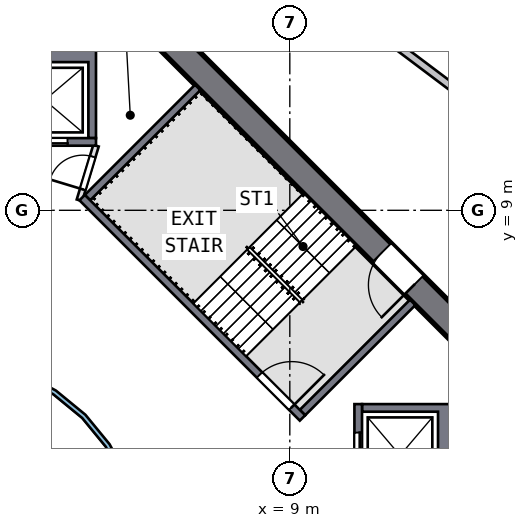
"""IFC4 building model, lengths in metres.
Left out: names, types, materials, properties, quantities, classifications, styles, units other than length and angle.
Written with IfcOpenShell. Run it as: python <this file> out.ifc"""

import sys

from ifc_helpers import new_model, si_unit, direction, frame, frame_2d, origin, place, context, subcontext, project, spatial, polyline, rectangle, outline, extrude, element, fill, save


model = new_model("IFC4")
c1 = context("Model", 3, precision=1e-05, world=origin(), true_north=direction((0.0, 1.0)))
c2 = subcontext(c1, "Body", "Model", "MODEL_VIEW")
j1 = project(units=[si_unit("LENGTHUNIT", "METRE"), si_unit("PLANEANGLEUNIT", "RADIAN")], contexts=[c1])
p1 = place(None, origin())
s1 = spatial("IfcSite", under=j1, at=p1, CompositionType="ELEMENT")
p2 = place(p1, origin())
s2 = spatial("IfcBuilding", under=s1, at=p2, CompositionType="ELEMENT")
p3 = place(p2, frame((0.0, 0.0, 128.0)))
s3 = spatial("IfcBuildingStorey", under=s2, at=p3, CompositionType="ELEMENT", Elevation=128.0)
p4 = place(p3, frame((13.752, 5.552, 0.0), z_axis=(0.0, 0.0, 1.0), x_axis=(-0.707106781, 0.707106781, 0.0)))
e1 = element("IfcWall", 1, at=p4, inside=s3, PredefinedType="SHEAR", context=c2, shape_type="SweptSolid", body=[
    extrude(rectangle(XDim=11.598, YDim=0.7, at=frame_2d((5.799, 0.0))), origin(), (0.0, 0.0, 1.0), 5.0),
])
p5 = place(p4, frame((2.099, 0.0, 0.0)))
e2 = element("IfcOpeningElement", 2, at=p5, cuts=e1, PredefinedType="OPENING", context=c2, shape_type="SweptSolid", body=[
    extrude(rectangle(XDim=1.2, YDim=2.1, at=frame_2d((0.6, 1.05))), frame((0.0, 0.36, 0.0), z_axis=(0.0, -1.0, 0.0), x_axis=(1.0, 0.0, 0.0)), (0.0, 0.0, 1.0), 0.72),
])
p6 = place(p3, origin())
e3 = element("IfcWall", 3, at=p6, inside=s3, PredefinedType="SOLIDWALL", context=c2, shape_type="SweptSolid", body=[
    extrude(outline(polyline([(13.3, 3.9), (13.3, 1.2), (10.9, 1.2), (10.9, 1.4), (12.9, 1.4), (12.9, 3.7), (10.9, 3.7), (10.9, 3.9), (13.3, 3.9)])), origin(), (0.0, 0.0, 1.0), 4.69),
])
p7 = place(p3, frame((10.8, 1.2, 0.0), z_axis=(0.0, 0.0, 1.0), x_axis=(0.0, 1.0, 0.0)))
e4 = element("IfcWall", 4, at=p7, inside=s3, PredefinedType="SOLIDWALL", context=c2, shape_type="SweptSolid", body=[
    extrude(rectangle(XDim=2.7, YDim=0.2, at=frame_2d((1.35, 0.0))), origin(), (0.0, 0.0, 1.0), 4.69),
])
p8 = place(p7, frame((0.75, 0.0, 0.0)))
e5 = element("IfcOpeningElement", 5, at=p8, cuts=e4, PredefinedType="OPENING", context=c2, shape_type="SweptSolid", body=[
    extrude(rectangle(XDim=1.2, YDim=2.1, at=frame_2d((0.6, 1.05))), frame((0.0, 0.11, 0.0), z_axis=(0.0, -1.0, 0.0), x_axis=(1.0, 0.0, 0.0)), (0.0, 0.0, 1.0), 0.22),
])
p9 = place(p3, origin())
e6 = element("IfcWall", 6, at=p9, inside=s3, PredefinedType="SOLIDWALL", context=c2, shape_type="SweptSolid", body=[
    extrude(outline(polyline([(3.9, 13.3), (3.9, 10.9), (3.7, 10.9), (3.7, 12.9), (1.4, 12.9), (1.4, 10.9), (1.2, 10.9), (1.2, 13.3), (3.9, 13.3)])), origin(), (0.0, 0.0, 1.0), 4.69),
])
p10 = place(p3, frame((1.2, 10.8, 0.0), z_axis=(0.0, 0.0, 1.0), x_axis=(1.0, 0.0, 0.0)))
e7 = element("IfcWall", 7, at=p10, inside=s3, PredefinedType="SOLIDWALL", context=c2, shape_type="SweptSolid", body=[
    extrude(rectangle(XDim=2.7, YDim=0.2, at=frame_2d((1.35, 0.0))), origin(), (0.0, 0.0, 1.0), 4.69),
])
p11 = place(p10, frame((0.75, 0.0, 0.0)))
e8 = element("IfcOpeningElement", 8, at=p11, cuts=e7, PredefinedType="OPENING", context=c2, shape_type="SweptSolid", body=[
    extrude(rectangle(XDim=1.2, YDim=2.1, at=frame_2d((0.6, 1.05))), frame((0.0, 0.11, 0.0), z_axis=(0.0, -1.0, 0.0), x_axis=(1.0, 0.0, 0.0)), (0.0, 0.0, 1.0), 0.22),
])
p12 = place(p3, frame((3.535, 9.334, 0.0), z_axis=(0.0, 0.0, 1.0), x_axis=(0.707106781, -0.707106781, 0.0)))
e9 = element("IfcWall", 9, at=p12, inside=s3, PredefinedType="SOLIDWALL", context=c2, shape_type="SweptSolid", body=[
    extrude(rectangle(XDim=8.2, YDim=0.2, at=frame_2d((4.1, 0.0))), origin(), (0.0, 0.0, 1.0), 4.69),
])
p13 = place(p12, frame((6.6, 0.0, 0.0)))
e10 = element("IfcOpeningElement", 10, at=p13, cuts=e9, PredefinedType="OPENING", context=c2, shape_type="SweptSolid", body=[
    extrude(rectangle(XDim=1.2, YDim=2.1, at=frame_2d((0.6, 1.05))), frame((0.0, 0.11, 0.0), z_axis=(0.0, -1.0, 0.0), x_axis=(1.0, 0.0, 0.0)), (0.0, 0.0, 1.0), 0.22),
])
for number, where, z_axis, x_axis in (
    (11, (9.334, 3.677, 0.0), (0.0, 0.0, 1.0), (0.707, 0.707, 0.0)),
    (12, (3.677, 9.334, 0.0), (0.0, 0.0, 1.0), (0.707, 0.707, 0.0)),
):
    element("IfcWall", number, at=place(p3, frame(where, z_axis=z_axis, x_axis=x_axis)), inside=s3, PredefinedType="SOLIDWALL", context=c2, shape_type="SweptSolid", body=[
        extrude(rectangle(XDim=4.1, YDim=0.2, at=frame_2d((2.05, 0.0))), origin(), (0.0, 0.0, 1.0), 4.69),
    ])
p14 = place(p3, frame((3.465, 9.263, 0.0), z_axis=(0.0, 0.0, 1.0), x_axis=(0.289808785, 0.957084567, 0.0)))
e13 = element("IfcWall", 13, at=p14, inside=s3, PredefinedType="PARTITIONING", context=c2, shape_type="SweptSolid", body=[
    extrude(rectangle(XDim=1.501, YDim=0.15, at=frame_2d((0.75, 0.0))), origin(), (0.0, 0.0, 1.0), 4.69),
])
p15 = place(p14, frame((0.301, 0.0, 0.0)))
e14 = element("IfcOpeningElement", 14, at=p15, cuts=e13, PredefinedType="OPENING", context=c2, shape_type="SweptSolid", body=[
    extrude(rectangle(XDim=0.9, YDim=2.1, at=frame_2d((0.45, 1.05))), frame((0.0, 0.085, 0.0), z_axis=(0.0, -1.0, 0.0), x_axis=(1.0, 0.0, 0.0)), (0.0, 0.0, 1.0), 0.17),
])
p16 = place(p3, origin())
e15 = element("IfcWall", 15, at=p16, inside=s3, PredefinedType="SOLIDWALL", context=c2, shape_type="SweptSolid", body=[
    extrude(outline(polyline([(5.021, -0.999), (4.73, -1.959), (4.257, -2.844), (3.62, -3.62), (2.844, -4.257), (1.959, -4.73), (0.999, -5.021), (0.0, -5.12), (-0.999, -5.021), (-1.959, -4.73), (-2.844, -4.257), (-3.62, -3.62), (-4.257, -2.844), (-4.73, -1.959), (-5.021, -0.999), (-5.12, 0.0), (-5.021, 0.999), (-4.73, 1.959), (-4.257, 2.844), (-3.62, 3.62), (-2.844, 4.257), (-1.959, 4.73), (-0.999, 5.021), (0.0, 5.12), (0.999, 5.021), (1.959, 4.73), (2.844, 4.257), (3.62, 3.62), (4.257, 2.844), (4.73, 1.959), (5.021, 0.999), (5.12, 0.0), (5.021, -0.999)]), holes=[polyline([(4.904, 0.976), (4.619, 1.913), (4.157, 2.778), (3.535, 3.535), (2.778, 4.157), (1.913, 4.619), (0.976, 4.904), (0.0, 5.0), (-0.976, 4.904), (-1.913, 4.619), (-2.778, 4.157), (-3.535, 3.535), (-4.157, 2.778), (-4.619, 1.913), (-4.904, 0.976), (-5.0, 0.0), (-4.904, -0.976), (-4.619, -1.913), (-4.157, -2.778), (-3.535, -3.535), (-2.778, -4.157), (-1.913, -4.619), (-0.976, -4.904), (0.0, -5.0), (0.976, -4.904), (1.913, -4.619), (2.778, -4.157), (3.535, -3.535), (4.157, -2.778), (4.619, -1.913), (4.904, -0.976), (5.0, 0.0), (4.904, 0.976)])]), origin(), (0.0, 0.0, 1.0), 4.69),
])
p17 = place(p3, frame((7.035, 16.93, 0.0), z_axis=(0.0, 0.0, 1.0), x_axis=(0.799039784, -0.601278158, 0.0)))
e16 = element("IfcWall", 16, at=p17, inside=s3, PredefinedType="SOLIDWALL", context=c2, shape_type="SweptSolid", body=[
    extrude(rectangle(XDim=9.316, YDim=0.2, at=frame_2d((4.658, 0.0))), origin(), (0.0, 0.0, 1.0), 4.69),
])
p18 = place(p17, frame((0.2, 0.0, 0.0)))
e17 = element("IfcOpeningElement", 17, at=p18, cuts=e16, PredefinedType="OPENING", context=c2, shape_type="SweptSolid", body=[
    extrude(rectangle(XDim=1.0, YDim=2.1, at=frame_2d((0.5, 1.05))), frame((0.0, 0.11, 0.0), z_axis=(0.0, -1.0, 0.0), x_axis=(1.0, 0.0, 0.0)), (0.0, 0.0, 1.0), 0.22),
])
p19 = place(p8, origin())
e18 = element("IfcDoor", 18, at=p19, inside=s3, OperationType="DOUBLE_DOOR_SLIDING", PredefinedType="DOOR", context=c2, shape_type="SweptSolid", body=[
    extrude(rectangle(XDim=1.2, YDim=2.1, at=frame_2d((0.6, 1.05))), frame((0.0, 0.025, 0.0), z_axis=(0.0, -1.0, 0.0), x_axis=(1.0, 0.0, 0.0)), (0.0, 0.0, 1.0), 0.05),
])
fill(e5, e18)
p20 = place(p11, origin())
e19 = element("IfcDoor", 19, at=p20, inside=s3, OperationType="DOUBLE_DOOR_SLIDING", PredefinedType="DOOR", context=c2, shape_type="SweptSolid", body=[
    extrude(rectangle(XDim=1.2, YDim=2.1, at=frame_2d((0.6, 1.05))), frame((0.0, 0.025, 0.0), z_axis=(0.0, -1.0, 0.0), x_axis=(1.0, 0.0, 0.0)), (0.0, 0.0, 1.0), 0.05),
])
fill(e8, e19)
p21 = place(p13, origin())
e20 = element("IfcDoor", 20, at=p21, inside=s3, OperationType="SINGLE_SWING_RIGHT", PredefinedType="DOOR", context=c2, shape_type="SweptSolid", body=[
    extrude(rectangle(XDim=1.2, YDim=2.1, at=frame_2d((0.6, 1.05))), frame((0.0, 0.025, 0.0), z_axis=(0.0, -1.0, 0.0), x_axis=(1.0, 0.0, 0.0)), (0.0, 0.0, 1.0), 0.05),
])
fill(e10, e20)
p22 = place(p5, origin())
e21 = element("IfcDoor", 21, at=p22, inside=s3, OperationType="SINGLE_SWING_LEFT", PredefinedType="DOOR", context=c2, shape_type="SweptSolid", body=[
    extrude(rectangle(XDim=1.2, YDim=2.1, at=frame_2d((0.6, 1.05))), frame((0.0, 0.025, 0.0), z_axis=(0.0, -1.0, 0.0), x_axis=(1.0, 0.0, 0.0)), (0.0, 0.0, 1.0), 0.05),
])
fill(e2, e21)
p23 = place(p15, origin())
e22 = element("IfcDoor", 22, at=p23, inside=s3, OperationType="SINGLE_SWING_LEFT", PredefinedType="DOOR", context=c2, shape_type="SweptSolid", body=[
    extrude(rectangle(XDim=0.9, YDim=2.1, at=frame_2d((0.45, 1.05))), frame((0.0, 0.025, 0.0), z_axis=(0.0, -1.0, 0.0), x_axis=(1.0, 0.0, 0.0)), (0.0, 0.0, 1.0), 0.05),
])
fill(e14, e22)
save(model, sys.argv[1])
